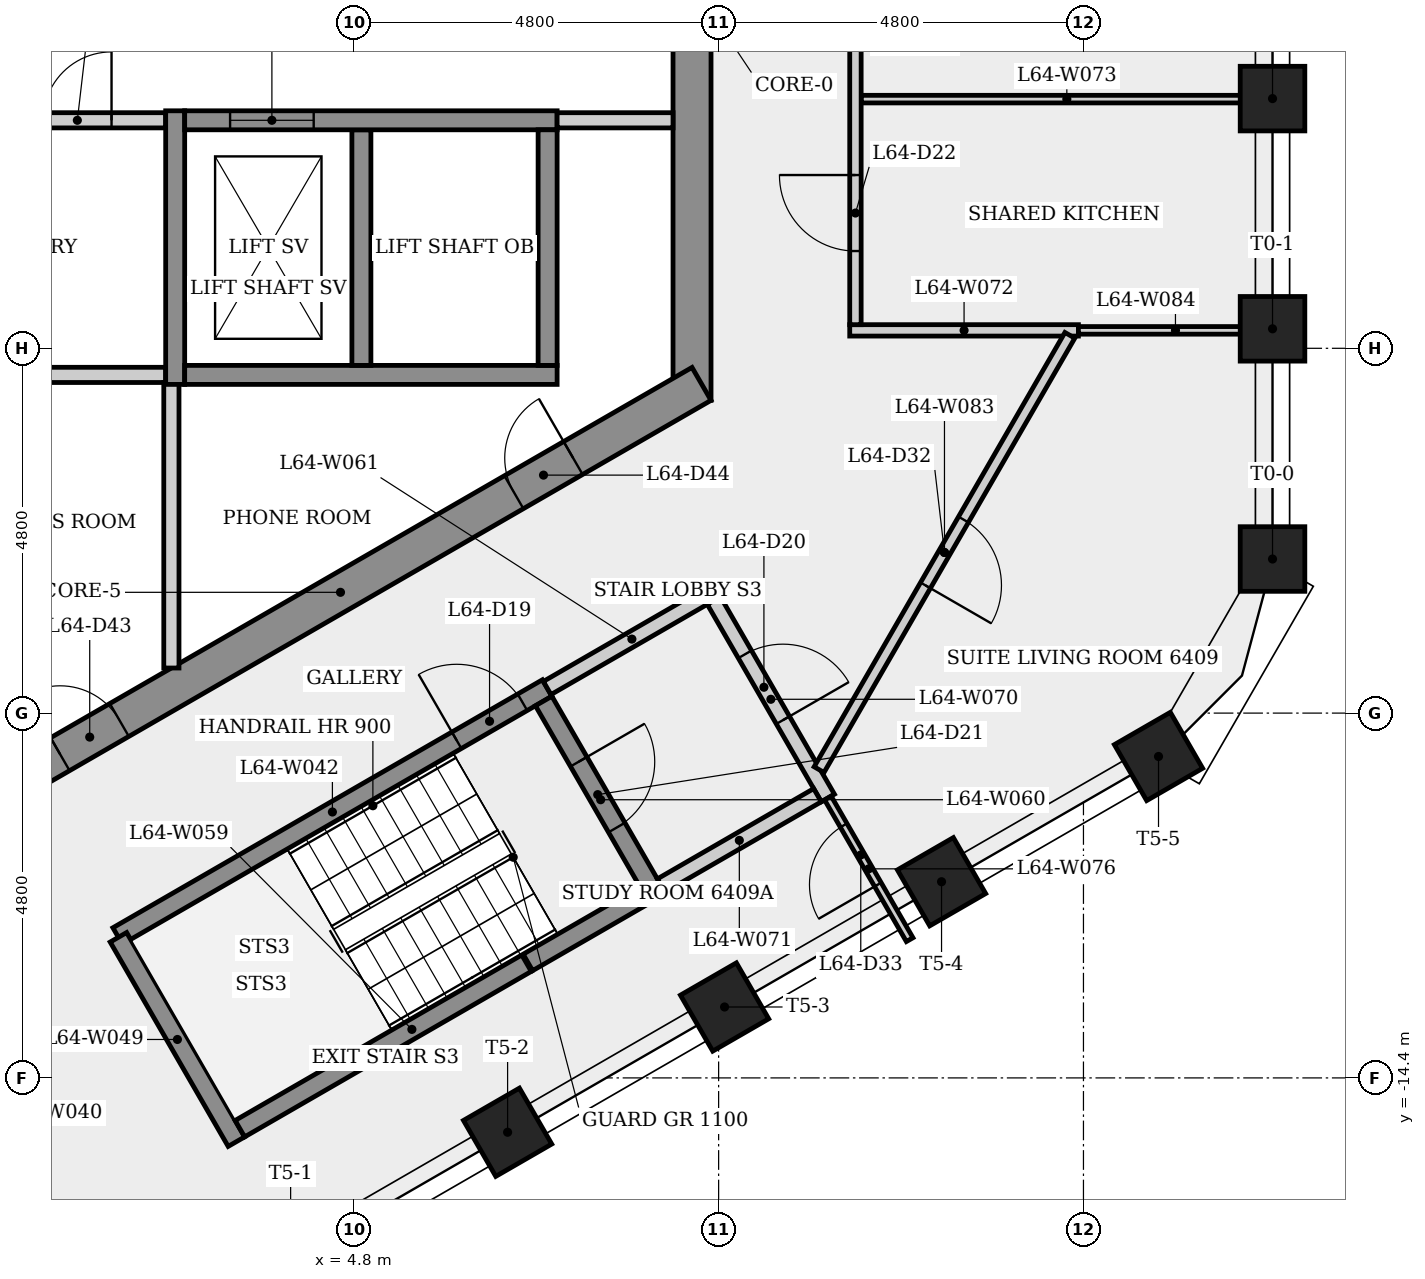
"""IFC4 building model, lengths in metres.
Left out: names, types, materials, properties, quantities, classifications, styles, units other than length and angle.
Written with IfcOpenShell. Run it as: python <this file> out.ifc"""

import sys

from ifc_helpers import new_model, si_unit, direction, frame, frame_2d, origin, origin_2d, place, context, subcontext, project, spatial, rectangle, extrude, element, fill, save


model = new_model("IFC4")
c1 = context("Model", 3, precision=1e-05, world=origin(), true_north=direction((0.0, 1.0)))
c2 = subcontext(c1, "Body", "Model", "MODEL_VIEW")
j1 = project(units=[si_unit("LENGTHUNIT", "METRE"), si_unit("PLANEANGLEUNIT", "RADIAN")], contexts=[c1])
p1 = place(None, origin())
s1 = spatial("IfcSite", under=j1, at=p1, CompositionType="ELEMENT")
p2 = place(p1, origin())
s2 = spatial("IfcBuilding", under=s1, at=p2, CompositionType="ELEMENT")
p3 = place(p2, frame((0.0, 0.0, 239.3)))
s3 = spatial("IfcBuildingStorey", under=s2, at=p3, CompositionType="ELEMENT", Elevation=239.3)
p4 = place(p3, frame((9.25, -5.485, 0.0), z_axis=(0.0, 0.0, 1.0), x_axis=(0.0, 1.0, 0.0)))
e1 = element("IfcWall", 1, at=p4, inside=s3, PredefinedType="SHEAR", context=c2, shape_type="SweptSolid", body=[
    extrude(rectangle(XDim=10.97, YDim=0.5, at=frame_2d((5.485, 0.0))), origin(), (0.0, 0.0, 1.0), 3.4),
])
p5 = place(p4, frame((4.685, 0.0, 0.0)))
e2 = element("IfcOpeningElement", 2, at=p5, cuts=e1, PredefinedType="OPENING", context=c2, shape_type="SweptSolid", body=[
    extrude(rectangle(XDim=1.6, YDim=2.1, at=frame_2d((0.8, 1.05))), frame((0.0, 0.26, 0.0), z_axis=(0.0, -1.0, 0.0), x_axis=(1.0, 0.0, 0.0)), (0.0, 0.0, 1.0), 0.52),
])
p6 = place(p3, frame((-0.125, -10.753, 0.0), z_axis=(0.0, 0.0, 1.0), x_axis=(0.866023993627, 0.500002442456, 0.0)))
e3 = element("IfcWall", 3, at=p6, inside=s3, PredefinedType="SHEAR", context=c2, shape_type="SweptSolid", body=[
    extrude(rectangle(XDim=10.97, YDim=0.5, at=frame_2d((5.485, 0.0))), origin(), (0.0, 0.0, 1.0), 3.4),
])
p7 = place(p6, frame((1.225, 0.0, 0.0)))
e4 = element("IfcOpeningElement", 4, at=p7, cuts=e3, PredefinedType="OPENING", context=c2, shape_type="SweptSolid", body=[
    extrude(rectangle(XDim=0.9, YDim=2.1, at=frame_2d((0.45, 1.05))), frame((0.0, 0.26, 0.0), z_axis=(0.0, -1.0, 0.0), x_axis=(1.0, 0.0, 0.0)), (0.0, 0.0, 1.0), 0.52),
])
p8 = place(p6, frame((8.119, 0.0, 0.0)))
e5 = element("IfcOpeningElement", 5, at=p8, cuts=e3, PredefinedType="OPENING", context=c2, shape_type="SweptSolid", body=[
    extrude(rectangle(XDim=0.9, YDim=2.1, at=frame_2d((0.45, 1.05))), frame((0.0, 0.26, 0.0), z_axis=(0.0, -1.0, 0.0), x_axis=(1.0, 0.0, 0.0)), (0.0, 0.0, 1.0), 0.52),
])
for number, where, z_axis, x_axis in (
    (6, (16.887, -7.573, 0.0), (0.0, 0.0, 1.0), (1.0, 0.0, 0.0)),
    (7, (16.887, -4.543, 0.0), (0.0, 0.0, 1.0), (1.0, 0.0, 0.0)),
    (8, (16.887, -1.514, 0.0), (0.0, 0.0, 1.0), (1.0, 0.0, 0.0)),
    (9, (6.823, -15.115, 0.0), (0.0, 0.0, 1.0), (0.5, -0.866, 0.0)),
    (10, (9.678, -13.467, 0.0), (0.0, 0.0, 1.0), (0.5, -0.866, 0.0)),
    (11, (12.533, -11.819, 0.0), (0.0, 0.0, 1.0), (0.5, -0.866, 0.0)),
    (12, (15.387, -10.171, 0.0), (0.0, 0.0, 1.0), (0.5, -0.866, 0.0)),
):
    element("IfcColumn", number, at=place(p3, frame(where, z_axis=z_axis, x_axis=x_axis)), inside=s3, PredefinedType="COLUMN", context=c2, shape_type="SweptSolid", body=[
        extrude(rectangle(XDim=0.85, YDim=0.85, at=origin_2d()), origin(), (0.0, 0.0, 1.0), 3.4),
    ])
p9 = place(p3, frame((-9.0, -5.15, 0.0), z_axis=(0.0, 0.0, 1.0), x_axis=(1.0, 0.0, 0.0)))
e13 = element("IfcWall", 13, at=p9, inside=s3, PredefinedType="PARTITIONING", context=c2, shape_type="SweptSolid", body=[
    extrude(rectangle(XDim=11.325, YDim=0.2, at=frame_2d((5.663, 0.0))), origin(), (0.0, 0.0, 1.0), 3.05),
])
p10 = place(p3, frame((-9.0, -1.8, 0.0), z_axis=(0.0, 0.0, 1.0), x_axis=(1.0, 0.0, 0.0)))
e14 = element("IfcWall", 14, at=p10, inside=s3, PredefinedType="PARTITIONING", context=c2, shape_type="SweptSolid", body=[
    extrude(rectangle(XDim=11.325, YDim=0.2, at=frame_2d((5.663, 0.0))), origin(), (0.0, 0.0, 1.0), 3.05),
])
p11 = place(p10, frame((2.21, 0.0, 0.0)))
e15 = element("IfcOpeningElement", 15, at=p11, cuts=e14, PredefinedType="OPENING", context=c2, shape_type="SweptSolid", body=[
    extrude(rectangle(XDim=0.9, YDim=2.1, at=frame_2d((0.45, 1.05))), frame((0.0, 0.11, 0.0), z_axis=(0.0, -1.0, 0.0), x_axis=(1.0, 0.0, 0.0)), (0.0, 0.0, 1.0), 0.22),
])
p12 = place(p10, frame((6.71, 0.0, 0.0)))
e16 = element("IfcOpeningElement", 16, at=p12, cuts=e14, PredefinedType="OPENING", context=c2, shape_type="SweptSolid", body=[
    extrude(rectangle(XDim=0.9, YDim=2.1, at=frame_2d((0.45, 1.05))), frame((0.0, 0.11, 0.0), z_axis=(0.0, -1.0, 0.0), x_axis=(1.0, 0.0, 0.0)), (0.0, 0.0, 1.0), 0.22),
])
p13 = place(p10, frame((9.713, 0.0, 0.0)))
e17 = element("IfcOpeningElement", 17, at=p13, cuts=e14, PredefinedType="OPENING", context=c2, shape_type="SweptSolid", body=[
    extrude(rectangle(XDim=0.9, YDim=2.1, at=frame_2d((0.45, 1.05))), frame((0.0, 0.11, 0.0), z_axis=(0.0, -1.0, 0.0), x_axis=(1.0, 0.0, 0.0)), (0.0, 0.0, 1.0), 0.22),
])
p14 = place(p3, frame((1.693, -12.532, 0.0), z_axis=(0.0, 0.0, 1.0), x_axis=(0.866031063448, 0.499990197047, 0.0)))
e18 = element("IfcWall", 18, at=p14, inside=s3, PredefinedType="SHEAR", context=c2, shape_type="SweptSolid", body=[
    extrude(rectangle(XDim=6.525, YDim=0.25, at=frame_2d((3.263, 0.0))), origin(), (0.0, 0.0, 1.0), 3.05),
])
p15 = place(p14, frame((5.15, 0.0, 0.0)))
e19 = element("IfcOpeningElement", 19, at=p15, cuts=e18, PredefinedType="OPENING", context=c2, shape_type="SweptSolid", body=[
    extrude(rectangle(XDim=1.0, YDim=2.1, at=frame_2d((0.5, 1.05))), frame((0.0, 0.135, 0.0), z_axis=(0.0, -1.0, 0.0), x_axis=(1.0, 0.0, 0.0)), (0.0, 0.0, 1.0), 0.27),
])
p16 = place(p3, frame((2.4, -5.25, 0.0), z_axis=(0.0, 0.0, 1.0), x_axis=(0.0, -1.0, 0.0)))
e20 = element("IfcWall", 20, at=p16, inside=s3, PredefinedType="PARTITIONING", context=c2, shape_type="SweptSolid", body=[
    extrude(rectangle(XDim=3.757, YDim=0.2, at=frame_2d((1.878, 0.0))), origin(), (0.0, 0.0, 1.0), 3.05),
])
p17 = place(p3, frame((2.45, -5.275, 0.0), z_axis=(0.0, 0.0, 1.0), x_axis=(0.0, 1.0, 0.0)))
e21 = element("IfcWall", 21, at=p17, inside=s3, PredefinedType="SHEAR", context=c2, shape_type="SweptSolid", body=[
    extrude(rectangle(XDim=3.6, YDim=0.25, at=frame_2d((1.8, 0.0))), origin(), (0.0, 0.0, 1.0), 3.05),
])
p18 = place(p3, frame((3.256, -15.239, 0.0), z_axis=(0.0, 0.0, 1.0), x_axis=(-0.500003782172, 0.866023220135, 0.0)))
e22 = element("IfcWall", 22, at=p18, inside=s3, PredefinedType="SHEAR", context=c2, shape_type="SweptSolid", body=[
    extrude(rectangle(XDim=3.105, YDim=0.25, at=frame_2d((1.552, 0.0))), origin(), (0.0, 0.0, 1.0), 3.05),
])
p19 = place(p3, frame((2.575, -5.15, 0.0), z_axis=(0.0, 0.0, 1.0), x_axis=(1.0, 0.0, 0.0)))
e23 = element("IfcWall", 23, at=p19, inside=s3, PredefinedType="SHEAR", context=c2, shape_type="SweptSolid", body=[
    extrude(rectangle(XDim=4.9, YDim=0.25, at=frame_2d((2.45, 0.0))), origin(), (0.0, 0.0, 1.0), 3.05),
])
p20 = place(p3, frame((4.9, -1.925, 0.0), z_axis=(0.0, 0.0, 1.0), x_axis=(0.0, -1.0, 0.0)))
e24 = element("IfcWall", 24, at=p20, inside=s3, PredefinedType="SHEAR", context=c2, shape_type="SweptSolid", body=[
    extrude(rectangle(XDim=3.1, YDim=0.25, at=frame_2d((1.55, 0.0))), origin(), (0.0, 0.0, 1.0), 3.4),
])
p21 = place(p3, frame((2.575, -1.8, 0.0), z_axis=(0.0, 0.0, 1.0), x_axis=(1.0, 0.0, 0.0)))
e25 = element("IfcWall", 25, at=p21, inside=s3, PredefinedType="SHEAR", context=c2, shape_type="SweptSolid", body=[
    extrude(rectangle(XDim=4.9, YDim=0.25, at=frame_2d((2.45, 0.0))), origin(), (0.0, 0.0, 1.0), 3.05),
])
p22 = place(p21, frame((0.597, 0.0, 0.0)))
e26 = element("IfcOpeningElement", 26, at=p22, cuts=e25, PredefinedType="OPENING", context=c2, shape_type="SweptSolid", body=[
    extrude(rectangle(XDim=1.1, YDim=2.1, at=frame_2d((0.55, 1.05))), frame((0.0, 0.135, 0.0), z_axis=(0.0, -1.0, 0.0), x_axis=(1.0, 0.0, 0.0)), (0.0, 0.0, 1.0), 0.27),
])
p23 = place(p3, frame((7.073, -12.891, 0.0), z_axis=(0.0, 0.0, 1.0), x_axis=(-0.866023145199, -0.500003911965, 0.0)))
e27 = element("IfcWall", 27, at=p23, inside=s3, PredefinedType="SHEAR", context=c2, shape_type="SweptSolid", body=[
    extrude(rectangle(XDim=4.355, YDim=0.25, at=frame_2d((2.177, 0.0))), origin(), (0.0, 0.0, 1.0), 3.05),
])
p24 = place(p3, frame((7.298, -9.441, 0.0), z_axis=(0.0, 0.0, 1.0), x_axis=(0.50002537861, -0.866010750942, 0.0)))
e28 = element("IfcWall", 28, at=p24, inside=s3, PredefinedType="SHEAR", context=c2, shape_type="SweptSolid", body=[
    extrude(rectangle(XDim=3.0, YDim=0.25, at=frame_2d((1.5, 0.0))), origin(), (0.0, 0.0, 1.0), 3.05),
])
p25 = place(p24, frame((0.923, 0.0, 0.0)))
e29 = element("IfcOpeningElement", 29, at=p25, cuts=e28, PredefinedType="OPENING", context=c2, shape_type="SweptSolid", body=[
    extrude(rectangle(XDim=1.0, YDim=2.1, at=frame_2d((0.5, 1.05))), frame((0.0, 0.135, 0.0), z_axis=(0.0, -1.0, 0.0), x_axis=(1.0, 0.0, 0.0)), (0.0, 0.0, 1.0), 0.27),
])
p26 = place(p3, frame((7.344, -9.27, 0.0), z_axis=(0.0, 0.0, 1.0), x_axis=(0.866005588531, 0.500034319456, 0.0)))
e30 = element("IfcWall", 30, at=p26, inside=s3, PredefinedType="PARTITIONING", context=c2, shape_type="SweptSolid", body=[
    extrude(rectangle(XDim=2.575, YDim=0.2, at=frame_2d((1.288, 0.0))), origin(), (0.0, 0.0, 1.0), 3.05),
])
p27 = place(p3, frame((7.35, -1.925, 0.0), z_axis=(0.0, 0.0, 1.0), x_axis=(0.0, -1.0, 0.0)))
e31 = element("IfcWall", 31, at=p27, inside=s3, PredefinedType="SHEAR", context=c2, shape_type="SweptSolid", body=[
    extrude(rectangle(XDim=3.1, YDim=0.25, at=frame_2d((1.55, 0.0))), origin(), (0.0, 0.0, 1.0), 3.4),
])
p28 = place(p3, frame((8.627, -11.993, 0.0), z_axis=(0.0, 0.0, 1.0), x_axis=(-0.866059624469, -0.499940723351, 0.0)))
e32 = element("IfcWall", 32, at=p28, inside=s3, PredefinedType="SHEAR", context=c2, shape_type="SweptSolid", body=[
    extrude(rectangle(XDim=1.775, YDim=0.25, at=frame_2d((0.888, 0.0))), origin(), (0.0, 0.0, 1.0), 3.05),
])
p29 = place(p3, frame((9.0, -1.8, 0.0), z_axis=(0.0, 0.0, 1.0), x_axis=(-1.0, 0.0, 0.0)))
e33 = element("IfcWall", 33, at=p29, inside=s3, PredefinedType="PARTITIONING", context=c2, shape_type="SweptSolid", body=[
    extrude(rectangle(XDim=1.525, YDim=0.2, at=frame_2d((0.763, 0.0))), origin(), (0.0, 0.0, 1.0), 3.05),
])
p30 = place(p3, frame((9.537, -8.119, 0.0), z_axis=(0.0, 0.0, 1.0), x_axis=(0.499990139034, -0.866031096941, 0.0)))
e34 = element("IfcWall", 34, at=p30, inside=s3, PredefinedType="PARTITIONING", context=c2, shape_type="SweptSolid", body=[
    extrude(rectangle(XDim=3.0, YDim=0.2, at=frame_2d((1.5, 0.0))), origin(), (0.0, 0.0, 1.0), 3.05),
])
p31 = place(p30, frame((0.817, 0.0, 0.0)))
e35 = element("IfcOpeningElement", 35, at=p31, cuts=e34, PredefinedType="OPENING", context=c2, shape_type="SweptSolid", body=[
    extrude(rectangle(XDim=1.0, YDim=2.1, at=frame_2d((0.5, 1.05))), frame((0.0, 0.11, 0.0), z_axis=(0.0, -1.0, 0.0), x_axis=(1.0, 0.0, 0.0)), (0.0, 0.0, 1.0), 0.22),
])
p32 = place(p3, frame((10.901, -10.681, 0.0), z_axis=(0.0, 0.0, 1.0), x_axis=(-0.866007538022, -0.500030943131, 0.0)))
e36 = element("IfcWall", 36, at=p32, inside=s3, PredefinedType="PARTITIONING", context=c2, shape_type="SweptSolid", body=[
    extrude(rectangle(XDim=2.375, YDim=0.2, at=frame_2d((1.188, 0.0))), origin(), (0.0, 0.0, 1.0), 3.05),
])
p33 = place(p3, frame((11.325, -4.564, 0.0), z_axis=(0.0, 0.0, 1.0), x_axis=(1.0, 0.0, 0.0)))
e37 = element("IfcWall", 37, at=p33, inside=s3, PredefinedType="PARTITIONING", context=c2, shape_type="SweptSolid", body=[
    extrude(rectangle(XDim=3.009, YDim=0.15, at=frame_2d((1.504, 0.0))), origin(), (0.0, 0.0, 1.0), 3.05),
])
p34 = place(p3, frame((11.475, -1.521, 0.0), z_axis=(0.0, 0.0, 1.0), x_axis=(1.0, 0.0, 0.0)))
e38 = element("IfcWall", 38, at=p34, inside=s3, PredefinedType="PARTITIONING", context=c2, shape_type="SweptSolid", body=[
    extrude(rectangle(XDim=5.412, YDim=0.1, at=frame_2d((2.706, 0.0))), origin(), (0.0, 0.0, 1.0), 3.05),
])
p35 = place(p3, frame((11.4, -4.489, 0.0), z_axis=(0.0, 0.0, 1.0), x_axis=(0.0, 1.0, 0.0)))
e39 = element("IfcWall", 39, at=p35, inside=s3, PredefinedType="PARTITIONING", context=c2, shape_type="SweptSolid", body=[
    extrude(rectangle(XDim=9.128, YDim=0.15, at=frame_2d((4.564, 0.0))), origin(), (0.0, 0.0, 1.0), 3.05),
])
p36 = place(p35, frame((0.969, 0.0, 0.0)))
e40 = element("IfcOpeningElement", 40, at=p36, cuts=e39, PredefinedType="OPENING", context=c2, shape_type="SweptSolid", body=[
    extrude(rectangle(XDim=1.0, YDim=2.1, at=frame_2d((0.5, 1.05))), frame((0.0, 0.085, 0.0), z_axis=(0.0, -1.0, 0.0), x_axis=(1.0, 0.0, 0.0)), (0.0, 0.0, 1.0), 0.17),
])
p37 = place(p35, frame((3.989, 0.0, 0.0)))
e41 = element("IfcOpeningElement", 41, at=p37, cuts=e39, PredefinedType="OPENING", context=c2, shape_type="SweptSolid", body=[
    extrude(rectangle(XDim=1.0, YDim=2.1, at=frame_2d((0.5, 1.05))), frame((0.0, 0.085, 0.0), z_axis=(0.0, -1.0, 0.0), x_axis=(1.0, 0.0, 0.0)), (0.0, 0.0, 1.0), 0.17),
])
p38 = place(p35, frame((7.032, 0.0, 0.0)))
e42 = element("IfcOpeningElement", 42, at=p38, cuts=e39, PredefinedType="OPENING", context=c2, shape_type="SweptSolid", body=[
    extrude(rectangle(XDim=1.0, YDim=2.1, at=frame_2d((0.5, 1.05))), frame((0.0, 0.085, 0.0), z_axis=(0.0, -1.0, 0.0), x_axis=(1.0, 0.0, 0.0)), (0.0, 0.0, 1.0), 0.17),
])
p39 = place(p3, frame((12.114, -12.581, 0.0), z_axis=(0.0, 0.0, 1.0), x_axis=(-0.499944992379, 0.86605716012, 0.0)))
e43 = element("IfcWall", 43, at=p39, inside=s3, PredefinedType="PARTITIONING", context=c2, shape_type="SweptSolid", body=[
    extrude(rectangle(XDim=2.153, YDim=0.1, at=frame_2d((1.076, 0.0))), origin(), (0.0, 0.0, 1.0), 3.05),
])
p40 = place(p39, frame((0.837, 0.0, 0.0)))
e44 = element("IfcOpeningElement", 44, at=p40, cuts=e43, PredefinedType="OPENING", context=c2, shape_type="SweptSolid", body=[
    extrude(rectangle(XDim=0.9, YDim=2.1, at=frame_2d((0.45, 1.05))), frame((0.0, 0.06, 0.0), z_axis=(0.0, -1.0, 0.0), x_axis=(1.0, 0.0, 0.0)), (0.0, 0.0, 1.0), 0.12),
])
p41 = place(p3, frame((14.221, -4.629, 0.0), z_axis=(0.0, 0.0, 1.0), x_axis=(-0.500010679957, -0.86601923762, 0.0)))
e45 = element("IfcWall", 45, at=p41, inside=s3, PredefinedType="PARTITIONING", context=c2, shape_type="SweptSolid", body=[
    extrude(rectangle(XDim=6.599, YDim=0.15, at=frame_2d((3.299, 0.0))), origin(), (0.0, 0.0, 1.0), 3.05),
])
p42 = place(p41, frame((2.799, 0.0, 0.0)))
e46 = element("IfcOpeningElement", 46, at=p42, cuts=e45, PredefinedType="OPENING", context=c2, shape_type="SweptSolid", body=[
    extrude(rectangle(XDim=1.0, YDim=2.1, at=frame_2d((0.5, 1.05))), frame((0.0, 0.085, 0.0), z_axis=(0.0, -1.0, 0.0), x_axis=(1.0, 0.0, 0.0)), (0.0, 0.0, 1.0), 0.17),
])
p43 = place(p3, frame((16.887, -4.564, 0.0), z_axis=(0.0, 0.0, 1.0), x_axis=(-1.0, 0.0, 0.0)))
e47 = element("IfcWall", 47, at=p43, inside=s3, PredefinedType="PARTITIONING", context=c2, shape_type="SweptSolid", body=[
    extrude(rectangle(XDim=2.554, YDim=0.1, at=frame_2d((1.277, 0.0))), origin(), (0.0, 0.0, 1.0), 3.05),
])
p44 = place(p22, origin())
e48 = element("IfcDoor", 48, at=p44, inside=s3, OperationType="SLIDING_TO_LEFT", PredefinedType="DOOR", context=c2, shape_type="SweptSolid", body=[
    extrude(rectangle(XDim=1.1, YDim=2.1, at=frame_2d((0.55, 1.05))), frame((0.0, 0.025, 0.0), z_axis=(0.0, -1.0, 0.0), x_axis=(1.0, 0.0, 0.0)), (0.0, 0.0, 1.0), 0.05),
])
fill(e26, e48)
p45 = place(p13, origin())
e49 = element("IfcDoor", 49, at=p45, inside=s3, OperationType="SINGLE_SWING_RIGHT", PredefinedType="DOOR", context=c2, shape_type="SweptSolid", body=[
    extrude(rectangle(XDim=0.9, YDim=2.1, at=frame_2d((0.45, 1.05))), frame((0.0, 0.025, 0.0), z_axis=(0.0, -1.0, 0.0), x_axis=(1.0, 0.0, 0.0)), (0.0, 0.0, 1.0), 0.05),
])
fill(e17, e49)
p46 = place(p15, origin())
e50 = element("IfcDoor", 50, at=p46, inside=s3, OperationType="SINGLE_SWING_LEFT", PredefinedType="DOOR", context=c2, shape_type="SweptSolid", body=[
    extrude(rectangle(XDim=1.0, YDim=2.1, at=frame_2d((0.5, 1.05))), frame((0.0, 0.025, 0.0), z_axis=(0.0, -1.0, 0.0), x_axis=(1.0, 0.0, 0.0)), (0.0, 0.0, 1.0), 0.05),
])
fill(e19, e50)
p47 = place(p31, origin())
e51 = element("IfcDoor", 51, at=p47, inside=s3, OperationType="SINGLE_SWING_RIGHT", PredefinedType="DOOR", context=c2, shape_type="SweptSolid", body=[
    extrude(rectangle(XDim=1.0, YDim=2.1, at=frame_2d((0.5, 1.05))), frame((0.0, 0.025, 0.0), z_axis=(0.0, -1.0, 0.0), x_axis=(1.0, 0.0, 0.0)), (0.0, 0.0, 1.0), 0.05),
])
fill(e35, e51)
p48 = place(p25, origin())
e52 = element("IfcDoor", 52, at=p48, inside=s3, OperationType="SINGLE_SWING_LEFT", PredefinedType="DOOR", context=c2, shape_type="SweptSolid", body=[
    extrude(rectangle(XDim=1.0, YDim=2.1, at=frame_2d((0.5, 1.05))), frame((0.0, 0.025, 0.0), z_axis=(0.0, -1.0, 0.0), x_axis=(1.0, 0.0, 0.0)), (0.0, 0.0, 1.0), 0.05),
])
fill(e29, e52)
p49 = place(p36, origin())
e53 = element("IfcDoor", 53, at=p49, inside=s3, OperationType="SINGLE_SWING_RIGHT", PredefinedType="DOOR", context=c2, shape_type="SweptSolid", body=[
    extrude(rectangle(XDim=1.0, YDim=2.1, at=frame_2d((0.5, 1.05))), frame((0.0, 0.025, 0.0), z_axis=(0.0, -1.0, 0.0), x_axis=(1.0, 0.0, 0.0)), (0.0, 0.0, 1.0), 0.05),
])
fill(e40, e53)
p50 = place(p42, origin())
e54 = element("IfcDoor", 54, at=p50, inside=s3, OperationType="SINGLE_SWING_RIGHT", PredefinedType="DOOR", context=c2, shape_type="SweptSolid", body=[
    extrude(rectangle(XDim=1.0, YDim=2.1, at=frame_2d((0.5, 1.05))), frame((0.0, 0.025, 0.0), z_axis=(0.0, -1.0, 0.0), x_axis=(1.0, 0.0, 0.0)), (0.0, 0.0, 1.0), 0.05),
])
fill(e46, e54)
p51 = place(p40, origin())
e55 = element("IfcDoor", 55, at=p51, inside=s3, OperationType="SINGLE_SWING_LEFT", PredefinedType="DOOR", context=c2, shape_type="SweptSolid", body=[
    extrude(rectangle(XDim=0.9, YDim=2.1, at=frame_2d((0.45, 1.05))), frame((0.0, 0.025, 0.0), z_axis=(0.0, -1.0, 0.0), x_axis=(1.0, 0.0, 0.0)), (0.0, 0.0, 1.0), 0.05),
])
fill(e44, e55)
p52 = place(p7, origin())
e56 = element("IfcDoor", 56, at=p52, inside=s3, OperationType="SINGLE_SWING_LEFT", PredefinedType="DOOR", context=c2, shape_type="SweptSolid", body=[
    extrude(rectangle(XDim=0.9, YDim=2.1, at=frame_2d((0.45, 1.05))), frame((0.0, 0.025, 0.0), z_axis=(0.0, -1.0, 0.0), x_axis=(1.0, 0.0, 0.0)), (0.0, 0.0, 1.0), 0.05),
])
fill(e4, e56)
p53 = place(p8, origin())
e57 = element("IfcDoor", 57, at=p53, inside=s3, OperationType="SINGLE_SWING_RIGHT", PredefinedType="DOOR", context=c2, shape_type="SweptSolid", body=[
    extrude(rectangle(XDim=0.9, YDim=2.1, at=frame_2d((0.45, 1.05))), frame((0.0, 0.025, 0.0), z_axis=(0.0, -1.0, 0.0), x_axis=(1.0, 0.0, 0.0)), (0.0, 0.0, 1.0), 0.05),
])
fill(e5, e57)
save(model, sys.argv[1])
